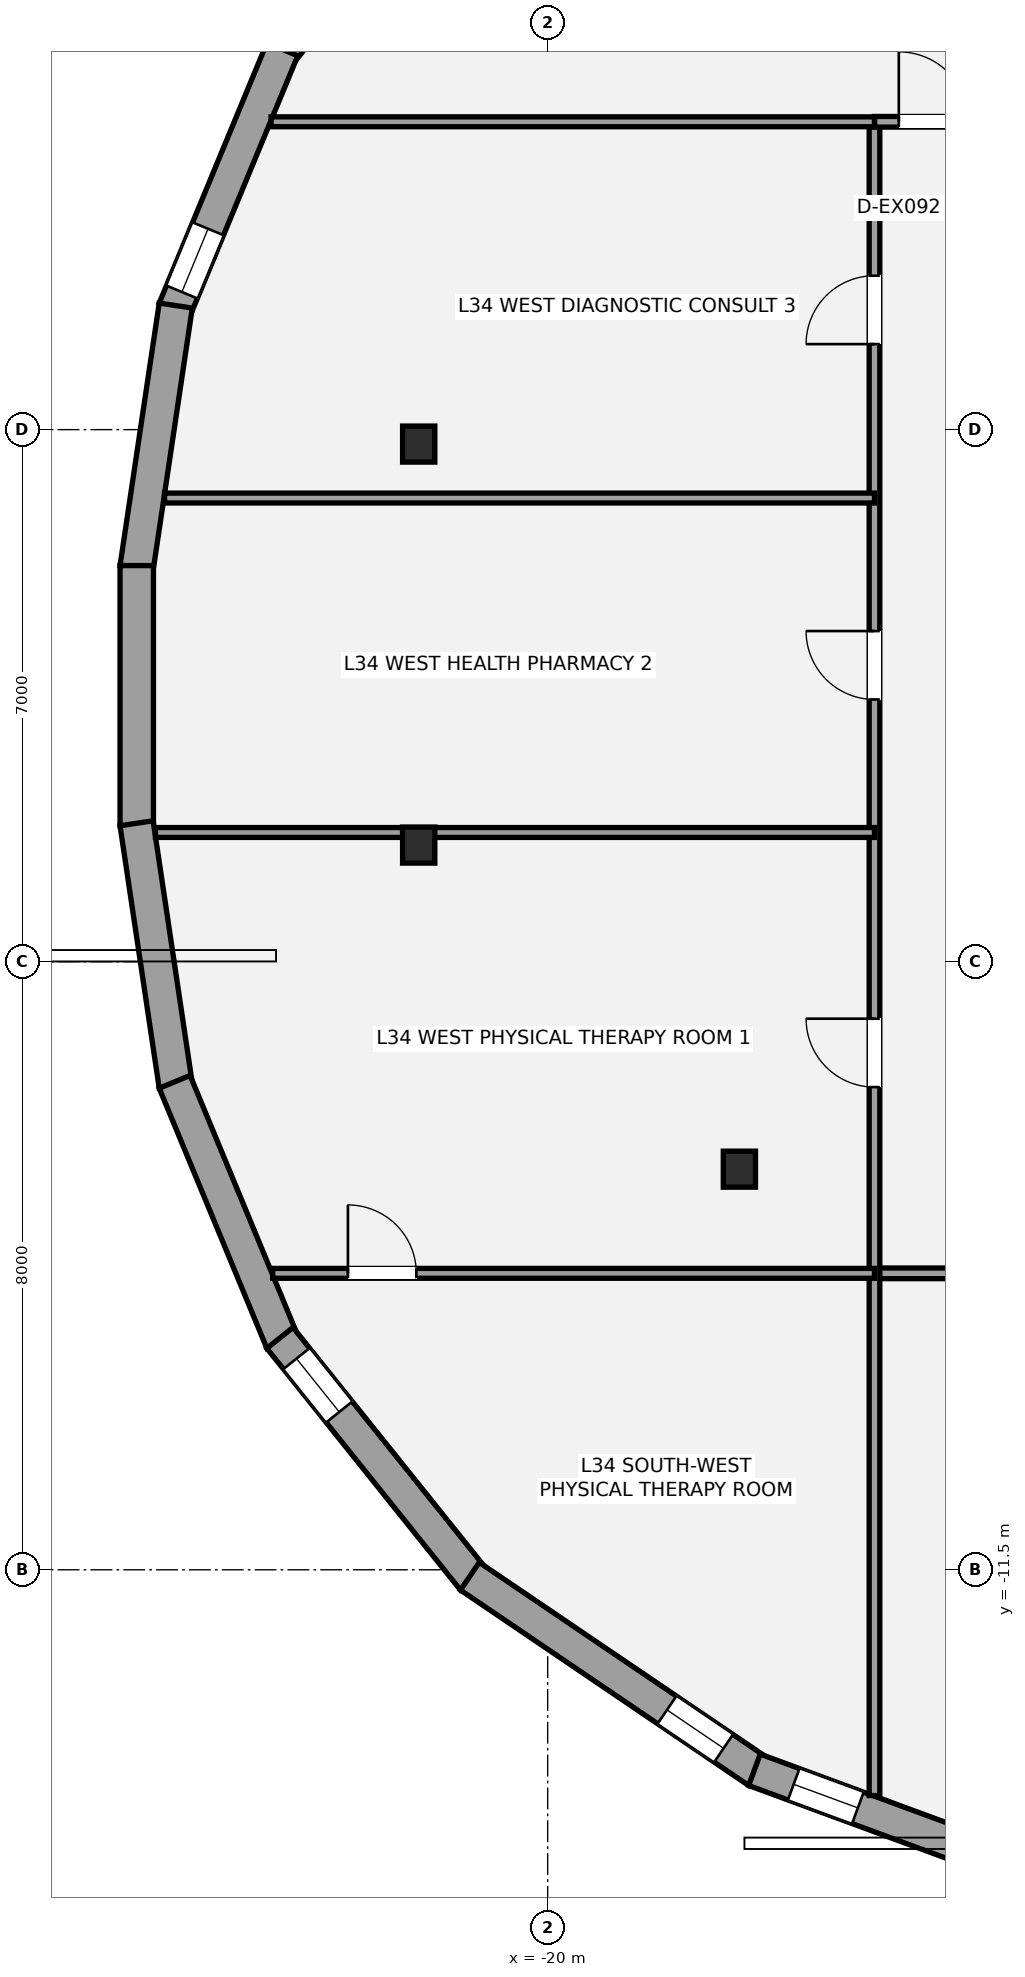
"""IFC4 building model, lengths in metres.
Left out: names, types, materials, properties, quantities, classifications, styles, units other than length and angle.
Written with IfcOpenShell. Run it as: python <this file> out.ifc"""

import sys

from ifc_helpers import new_model, si_unit, direction, frame, frame_2d, origin, origin_2d, place, context, subcontext, project, spatial, rectangle, i_section, extrude, element, fill, save


model = new_model("IFC4")
c1 = context("Model", 3, precision=1e-05, world=origin(), true_north=direction((0.0, 1.0)))
c2 = subcontext(c1, "Body", "Model", "MODEL_VIEW")
j1 = project(units=[si_unit("LENGTHUNIT", "METRE"), si_unit("PLANEANGLEUNIT", "RADIAN")], contexts=[c1])
p1 = place(None, origin())
s1 = spatial("IfcSite", under=j1, at=p1, CompositionType="ELEMENT")
p2 = place(p1, origin())
s2 = spatial("IfcBuilding", under=s1, at=p2, CompositionType="ELEMENT")
p3 = place(p2, frame((0.0, 0.0, 128.1)))
s3 = spatial("IfcBuildingStorey", under=s2, at=p3, CompositionType="ELEMENT", Elevation=128.1)
for number, where, z_axis, x_axis in (
    (1, (-21.697, 3.31, 0.0), (0.0, 0.0, 1.0), (1.0, 0.0, 0.0)),
    (2, (-21.697, -1.966, 0.0), (0.0, 0.0, 1.0), (1.0, 0.0, 0.0)),
    (3, (-17.477, -6.229, 0.0), (0.0, 0.0, 1.0), (1.0, 0.0, 0.0)),
):
    element("IfcColumn", number, at=place(p3, frame(where, z_axis=z_axis, x_axis=x_axis)), inside=s3, PredefinedType="COLUMN", context=c2, shape_type="SweptSolid", body=[
        extrude(i_section(OverallWidth=0.424, OverallDepth=0.474, WebThickness=0.048, FlangeThickness=0.077, at=origin_2d()), origin(), (0.0, 0.0, 1.0), 3.5),
    ])
p4 = place(p3, frame((-23.523, 8.449, 0.0), z_axis=(0.0, 0.0, 1.0), x_axis=(0.625169926256, 0.780488669556, 0.0)))
e4 = element("IfcWall", 4, at=p4, inside=s3, PredefinedType="STANDARD", context=c2, shape_type="SweptSolid", body=[
    extrude(rectangle(XDim=4.074, YDim=0.44, at=frame_2d((2.037, 0.0))), origin(), (0.0, 0.0, 1.0), 2.528),
])
p5 = place(p4, frame((2.875, 0.0, 0.58)))
e5 = element("IfcOpeningElement", 5, at=p5, cuts=e4, PredefinedType="OPENING", context=c2, shape_type="SweptSolid", body=[
    extrude(rectangle(XDim=0.9, YDim=1.35, at=frame_2d((0.45, 0.675))), frame((0.0, 0.23, 0.0), z_axis=(0.0, -1.0, 0.0), x_axis=(1.0, 0.0, 0.0)), (0.0, 0.0, 1.0), 0.46),
])
p6 = place(p3, frame((-24.908, 5.081, 0.0), z_axis=(0.0, 0.0, 1.0), x_axis=(0.382433297136, 0.923983102249, 0.0)))
e6 = element("IfcWall", 6, at=p6, inside=s3, PredefinedType="STANDARD", context=c2, shape_type="SweptSolid", body=[
    extrude(rectangle(XDim=3.704, YDim=0.44, at=frame_2d((1.852, 0.0))), origin(), (0.0, 0.0, 1.0), 2.528),
])
p7 = place(p6, frame((0.249, 0.0, 0.42)))
e7 = element("IfcOpeningElement", 7, at=p7, cuts=e6, PredefinedType="OPENING", context=c2, shape_type="SweptSolid", body=[
    extrude(rectangle(XDim=0.9, YDim=1.35, at=frame_2d((0.45, 0.675))), frame((0.0, 0.23, 0.0), z_axis=(0.0, -1.0, 0.0), x_axis=(1.0, 0.0, 0.0)), (0.0, 0.0, 1.0), 0.46),
])
p8 = place(p3, frame((-25.409, 1.679, 0.0), z_axis=(0.0, 0.0, 1.0), x_axis=(0.147673688434, 0.989036137734, 0.0)))
e8 = element("IfcWall", 8, at=p8, inside=s3, PredefinedType="STANDARD", context=c2, shape_type="SweptSolid", body=[
    extrude(rectangle(XDim=3.492, YDim=0.44, at=frame_2d((1.746, 0.0))), origin(), (0.0, 0.0, 1.0), 2.528),
])
p9 = place(p3, frame((-25.406, -1.711, 0.0), z_axis=(0.0, 0.0, 1.0), x_axis=(0.0, 1.0, 0.0)))
e9 = element("IfcWall", 9, at=p9, inside=s3, PredefinedType="STANDARD", context=c2, shape_type="SweptSolid", body=[
    extrude(rectangle(XDim=3.422, YDim=0.44, at=frame_2d((1.711, 0.0))), origin(), (0.0, 0.0, 1.0), 2.528),
])
p10 = place(p3, frame((-24.893, -5.132, 0.0), z_axis=(0.0, 0.0, 1.0), x_axis=(-0.147673688434, 0.989036137734, 0.0)))
e10 = element("IfcWall", 10, at=p10, inside=s3, PredefinedType="STANDARD", context=c2, shape_type="SweptSolid", body=[
    extrude(rectangle(XDim=3.492, YDim=0.44, at=frame_2d((1.746, 0.0))), origin(), (0.0, 0.0, 1.0), 2.528),
])
p11 = place(p3, frame((-23.491, -8.503, 0.0), z_axis=(0.0, 0.0, 1.0), x_axis=(-0.382433297136, 0.923983102249, 0.0)))
e11 = element("IfcWall", 11, at=p11, inside=s3, PredefinedType="STANDARD", context=c2, shape_type="SweptSolid", body=[
    extrude(rectangle(XDim=3.704, YDim=0.44, at=frame_2d((1.852, 0.0))), origin(), (0.0, 0.0, 1.0), 2.528),
])
p12 = place(p3, frame((-20.976, -11.629, 0.0), z_axis=(0.0, 0.0, 1.0), x_axis=(-0.625169926256, 0.780488669556, 0.0)))
e12 = element("IfcWall", 12, at=p12, inside=s3, PredefinedType="STANDARD", context=c2, shape_type="SweptSolid", body=[
    extrude(rectangle(XDim=4.074, YDim=0.44, at=frame_2d((2.037, 0.0))), origin(), (0.0, 0.0, 1.0), 2.528),
])
p13 = place(p12, frame((2.826, 0.0, 0.58)))
e13 = element("IfcOpeningElement", 13, at=p13, cuts=e12, PredefinedType="OPENING", context=c2, shape_type="SweptSolid", body=[
    extrude(rectangle(XDim=0.9, YDim=1.35, at=frame_2d((0.45, 0.675))), frame((0.0, 0.23, 0.0), z_axis=(0.0, -1.0, 0.0), x_axis=(1.0, 0.0, 0.0)), (0.0, 0.0, 1.0), 0.46),
])
p14 = place(p3, frame((-17.232, -14.156, 0.0), z_axis=(0.0, 0.0, 1.0), x_axis=(-0.827687941294, 0.561188624116, 0.0)))
e14 = element("IfcWall", 14, at=p14, inside=s3, PredefinedType="STANDARD", context=c2, shape_type="SweptSolid", body=[
    extrude(rectangle(XDim=4.582, YDim=0.44, at=frame_2d((2.291, 0.0))), origin(), (0.0, 0.0, 1.0), 2.528),
])
p15 = place(p14, frame((0.548, 0.0, 0.58)))
e15 = element("IfcOpeningElement", 15, at=p15, cuts=e14, PredefinedType="OPENING", context=c2, shape_type="SweptSolid", body=[
    extrude(rectangle(XDim=0.9, YDim=1.35, at=frame_2d((0.45, 0.675))), frame((0.0, 0.23, 0.0), z_axis=(0.0, -1.0, 0.0), x_axis=(1.0, 0.0, 0.0)), (0.0, 0.0, 1.0), 0.46),
])
p16 = place(p3, frame((-12.589, -15.859, 0.0), z_axis=(0.0, 0.0, 1.0), x_axis=(-0.938408147313, 0.345528796278, 0.0)))
e16 = element("IfcWall", 16, at=p16, inside=s3, PredefinedType="STANDARD", context=c2, shape_type="SweptSolid", body=[
    extrude(rectangle(XDim=4.998, YDim=0.44, at=frame_2d((2.499, 0.0))), origin(), (0.0, 0.0, 1.0), 2.528),
])
p17 = place(p16, frame((3.548, 0.0, 0.58)))
e17 = element("IfcOpeningElement", 17, at=p17, cuts=e16, PredefinedType="OPENING", context=c2, shape_type="SweptSolid", body=[
    extrude(rectangle(XDim=0.9, YDim=1.35, at=frame_2d((0.45, 0.675))), frame((0.0, 0.23, 0.0), z_axis=(0.0, -1.0, 0.0), x_axis=(1.0, 0.0, 0.0)), (0.0, 0.0, 1.0), 0.46),
])
p18 = place(p3, frame((-15.7, -7.6, 0.0), z_axis=(0.0, 0.0, 1.0), x_axis=(1.0, 0.0, 0.0)))
e18 = element("IfcWall", 18, at=p18, inside=s3, PredefinedType="PARTITIONING", context=c2, shape_type="SweptSolid", body=[
    extrude(rectangle(XDim=32.2, YDim=0.14, at=frame_2d((16.1, 0.0))), origin(), (0.0, 0.0, 1.0), 2.688),
])
p19 = place(p18, frame((5.9, 0.0, 0.0)))
e19 = element("IfcOpeningElement", 19, at=p19, cuts=e18, PredefinedType="OPENING", context=c2, shape_type="SweptSolid", body=[
    extrude(rectangle(XDim=0.9, YDim=2.1, at=frame_2d((0.45, 1.05))), frame((0.0, 0.08, 0.0), z_axis=(0.0, -1.0, 0.0), x_axis=(1.0, 0.0, 0.0)), (0.0, 0.0, 1.0), 0.16),
])
p20 = place(p18, frame((16.5, 0.0, 0.0)))
e20 = element("IfcOpeningElement", 20, at=p20, cuts=e18, PredefinedType="OPENING", context=c2, shape_type="SweptSolid", body=[
    extrude(rectangle(XDim=0.9, YDim=2.1, at=frame_2d((0.45, 1.05))), frame((0.0, 0.08, 0.0), z_axis=(0.0, -1.0, 0.0), x_axis=(1.0, 0.0, 0.0)), (0.0, 0.0, 1.0), 0.16),
])
p21 = place(p18, frame((23.559, 0.0, 0.0)))
e21 = element("IfcOpeningElement", 21, at=p21, cuts=e18, PredefinedType="OPENING", context=c2, shape_type="SweptSolid", body=[
    extrude(rectangle(XDim=0.9, YDim=2.1, at=frame_2d((0.45, 1.05))), frame((0.0, 0.08, 0.0), z_axis=(0.0, -1.0, 0.0), x_axis=(1.0, 0.0, 0.0)), (0.0, 0.0, 1.0), 0.16),
])
p22 = place(p18, frame((27.619, 0.0, 0.0)))
e22 = element("IfcOpeningElement", 22, at=p22, cuts=e18, PredefinedType="OPENING", context=c2, shape_type="SweptSolid", body=[
    extrude(rectangle(XDim=0.9, YDim=2.1, at=frame_2d((0.45, 1.05))), frame((0.0, 0.08, 0.0), z_axis=(0.0, -1.0, 0.0), x_axis=(1.0, 0.0, 0.0)), (0.0, 0.0, 1.0), 0.16),
])
p23 = place(p18, frame((30.309, 0.0, 0.0)))
e23 = element("IfcOpeningElement", 23, at=p23, cuts=e18, PredefinedType="OPENING", context=c2, shape_type="SweptSolid", body=[
    extrude(rectangle(XDim=0.9, YDim=2.1, at=frame_2d((0.45, 1.05))), frame((0.0, 0.08, 0.0), z_axis=(0.0, -1.0, 0.0), x_axis=(1.0, 0.0, 0.0)), (0.0, 0.0, 1.0), 0.16),
])
p24 = place(p3, frame((-15.7, -14.47, 0.0), z_axis=(0.0, 0.0, 1.0), x_axis=(0.0, 1.0, 0.0)))
e24 = element("IfcWall", 24, at=p24, inside=s3, PredefinedType="PARTITIONING", context=c2, shape_type="SweptSolid", body=[
    extrude(rectangle(XDim=22.02, YDim=0.14, at=frame_2d((11.01, 0.0))), origin(), (0.0, 0.0, 1.0), 2.763),
])
p25 = place(p24, frame((9.32, 0.0, 0.0)))
e25 = element("IfcOpeningElement", 25, at=p25, cuts=e24, PredefinedType="OPENING", context=c2, shape_type="SweptSolid", body=[
    extrude(rectangle(XDim=0.9, YDim=2.1, at=frame_2d((0.45, 1.05))), frame((0.0, 0.08, 0.0), z_axis=(0.0, -1.0, 0.0), x_axis=(1.0, 0.0, 0.0)), (0.0, 0.0, 1.0), 0.16),
])
p26 = place(p24, frame((14.42, 0.0, 0.0)))
e26 = element("IfcOpeningElement", 26, at=p26, cuts=e24, PredefinedType="OPENING", context=c2, shape_type="SweptSolid", body=[
    extrude(rectangle(XDim=0.9, YDim=2.1, at=frame_2d((0.45, 1.05))), frame((0.0, 0.08, 0.0), z_axis=(0.0, -1.0, 0.0), x_axis=(1.0, 0.0, 0.0)), (0.0, 0.0, 1.0), 0.16),
])
p27 = place(p24, frame((19.095, 0.0, 0.0)))
e27 = element("IfcOpeningElement", 27, at=p27, cuts=e24, PredefinedType="OPENING", context=c2, shape_type="SweptSolid", body=[
    extrude(rectangle(XDim=0.9, YDim=2.1, at=frame_2d((0.45, 1.05))), frame((0.0, 0.08, 0.0), z_axis=(0.0, -1.0, 0.0), x_axis=(1.0, 0.0, 0.0)), (0.0, 0.0, 1.0), 0.16),
])
p28 = place(p3, frame((-15.7, 7.55, 0.0), z_axis=(0.0, 0.0, 1.0), x_axis=(1.0, 0.0, 0.0)))
e28 = element("IfcWall", 28, at=p28, inside=s3, PredefinedType="PARTITIONING", context=c2, shape_type="SweptSolid", body=[
    extrude(rectangle(XDim=1.8, YDim=0.14, at=frame_2d((0.9, 0.0))), origin(), (0.0, 0.0, 1.0), 2.763),
])
p29 = place(p28, frame((0.32, 0.0, 0.0)))
e29 = element("IfcOpeningElement", 29, at=p29, cuts=e28, PredefinedType="OPENING", context=c2, shape_type="SweptSolid", body=[
    extrude(rectangle(XDim=0.92, YDim=2.15, at=frame_2d((0.46, 1.075))), frame((0.0, 0.08, 0.0), z_axis=(0.0, -1.0, 0.0), x_axis=(1.0, 0.0, 0.0)), (0.0, 0.0, 1.0), 0.16),
])
p30 = place(p3, frame((-23.639, 7.55, 0.0), z_axis=(0.0, 0.0, 1.0), x_axis=(1.0, 0.0, 0.0)))
e30 = element("IfcWall", 30, at=p30, inside=s3, PredefinedType="PARTITIONING", context=c2, shape_type="SweptSolid", body=[
    extrude(rectangle(XDim=7.939, YDim=0.13, at=frame_2d((3.969, 0.0))), origin(), (0.0, 0.0, 1.0), 2.763),
])
p31 = place(p3, frame((-23.618, -7.6, 0.0), z_axis=(0.0, 0.0, 1.0), x_axis=(1.0, 0.0, 0.0)))
e31 = element("IfcWall", 31, at=p31, inside=s3, PredefinedType="PARTITIONING", context=c2, shape_type="SweptSolid", body=[
    extrude(rectangle(XDim=7.918, YDim=0.13, at=frame_2d((3.959, 0.0))), origin(), (0.0, 0.0, 1.0), 3.31),
])
p32 = place(p31, frame((0.99, 0.0, 0.0)))
e32 = element("IfcOpeningElement", 32, at=p32, cuts=e31, PredefinedType="OPENING", context=c2, shape_type="SweptSolid", body=[
    extrude(rectangle(XDim=0.9, YDim=2.1, at=frame_2d((0.45, 1.05))), frame((0.0, 0.075, 0.0), z_axis=(0.0, -1.0, 0.0), x_axis=(1.0, 0.0, 0.0)), (0.0, 0.0, 1.0), 0.15),
])
p33 = place(p3, frame((-25.16, -1.8, 0.0), z_axis=(0.0, 0.0, 1.0), x_axis=(1.0, 0.0, 0.0)))
e33 = element("IfcWall", 33, at=p33, inside=s3, PredefinedType="PARTITIONING", context=c2, shape_type="SweptSolid", body=[
    extrude(rectangle(XDim=9.46, YDim=0.13, at=frame_2d((4.73, 0.0))), origin(), (0.0, 0.0, 1.0), 2.763),
])
p34 = place(p3, frame((-25.041, 2.6, 0.0), z_axis=(0.0, 0.0, 1.0), x_axis=(1.0, 0.0, 0.0)))
e34 = element("IfcWall", 34, at=p34, inside=s3, PredefinedType="PARTITIONING", context=c2, shape_type="SweptSolid", body=[
    extrude(rectangle(XDim=9.341, YDim=0.13, at=frame_2d((4.67, 0.0))), origin(), (0.0, 0.0, 1.0), 2.763),
])
p35 = place(p7, origin())
e35 = element("IfcWindow", 35, at=p35, inside=s3, PartitioningType="SINGLE_PANEL", PredefinedType="WINDOW", context=c2, shape_type="SweptSolid", body=[
    extrude(rectangle(XDim=0.9, YDim=1.35, at=frame_2d((0.45, 0.675))), frame((0.0, -0.01, 0.0), z_axis=(0.0, -1.0, 0.0), x_axis=(1.0, 0.0, 0.0)), (0.0, 0.0, 1.0), 0.06),
])
fill(e7, e35)
p36 = place(p13, origin())
e36 = element("IfcWindow", 36, at=p36, inside=s3, PartitioningType="SINGLE_PANEL", PredefinedType="WINDOW", context=c2, shape_type="SweptSolid", body=[
    extrude(rectangle(XDim=0.9, YDim=1.35, at=frame_2d((0.45, 0.675))), frame((0.0, -0.01, 0.0), z_axis=(0.0, -1.0, 0.0), x_axis=(1.0, 0.0, 0.0)), (0.0, 0.0, 1.0), 0.06),
])
fill(e13, e36)
p37 = place(p15, origin())
e37 = element("IfcWindow", 37, at=p37, inside=s3, PartitioningType="SINGLE_PANEL", PredefinedType="WINDOW", context=c2, shape_type="SweptSolid", body=[
    extrude(rectangle(XDim=0.9, YDim=1.35, at=frame_2d((0.45, 0.675))), frame((0.0, -0.01, 0.0), z_axis=(0.0, -1.0, 0.0), x_axis=(1.0, 0.0, 0.0)), (0.0, 0.0, 1.0), 0.06),
])
fill(e15, e37)
p38 = place(p17, origin())
e38 = element("IfcWindow", 38, at=p38, inside=s3, PartitioningType="SINGLE_PANEL", PredefinedType="WINDOW", context=c2, shape_type="SweptSolid", body=[
    extrude(rectangle(XDim=0.9, YDim=1.35, at=frame_2d((0.45, 0.675))), frame((0.0, -0.01, 0.0), z_axis=(0.0, -1.0, 0.0), x_axis=(1.0, 0.0, 0.0)), (0.0, 0.0, 1.0), 0.06),
])
fill(e17, e38)
p39 = place(p29, origin())
e39 = element("IfcDoor", 39, at=p39, inside=s3, OperationType="SINGLE_SWING_LEFT", PredefinedType="DOOR", context=c2, shape_type="SweptSolid", body=[
    extrude(rectangle(XDim=0.92, YDim=2.15, at=frame_2d((0.46, 1.075))), frame((0.0, 0.025, 0.0), z_axis=(0.0, -1.0, 0.0), x_axis=(1.0, 0.0, 0.0)), (0.0, 0.0, 1.0), 0.05),
])
fill(e29, e39)
p40 = place(p32, origin())
e40 = element("IfcDoor", 40, at=p40, inside=s3, OperationType="SINGLE_SWING_LEFT", PredefinedType="DOOR", context=c2, shape_type="SweptSolid", body=[
    extrude(rectangle(XDim=0.9, YDim=2.1, at=frame_2d((0.45, 1.05))), frame((0.0, 0.025, 0.0), z_axis=(0.0, -1.0, 0.0), x_axis=(1.0, 0.0, 0.0)), (0.0, 0.0, 1.0), 0.05),
])
fill(e32, e40)
p41 = place(p25, origin())
e41 = element("IfcDoor", 41, at=p41, inside=s3, OperationType="SINGLE_SWING_RIGHT", PredefinedType="DOOR", context=c2, shape_type="SweptSolid", body=[
    extrude(rectangle(XDim=0.9, YDim=2.1, at=frame_2d((0.45, 1.05))), frame((0.0, 0.025, 0.0), z_axis=(0.0, -1.0, 0.0), x_axis=(1.0, 0.0, 0.0)), (0.0, 0.0, 1.0), 0.05),
])
fill(e25, e41)
p42 = place(p26, origin())
e42 = element("IfcDoor", 42, at=p42, inside=s3, OperationType="SINGLE_SWING_RIGHT", PredefinedType="DOOR", context=c2, shape_type="SweptSolid", body=[
    extrude(rectangle(XDim=0.9, YDim=2.1, at=frame_2d((0.45, 1.05))), frame((0.0, 0.025, 0.0), z_axis=(0.0, -1.0, 0.0), x_axis=(1.0, 0.0, 0.0)), (0.0, 0.0, 1.0), 0.05),
])
fill(e26, e42)
p43 = place(p27, origin())
e43 = element("IfcDoor", 43, at=p43, inside=s3, OperationType="SINGLE_SWING_LEFT", PredefinedType="DOOR", context=c2, shape_type="SweptSolid", body=[
    extrude(rectangle(XDim=0.9, YDim=2.1, at=frame_2d((0.45, 1.05))), frame((0.0, 0.025, 0.0), z_axis=(0.0, -1.0, 0.0), x_axis=(1.0, 0.0, 0.0)), (0.0, 0.0, 1.0), 0.05),
])
fill(e27, e43)
save(model, sys.argv[1])
